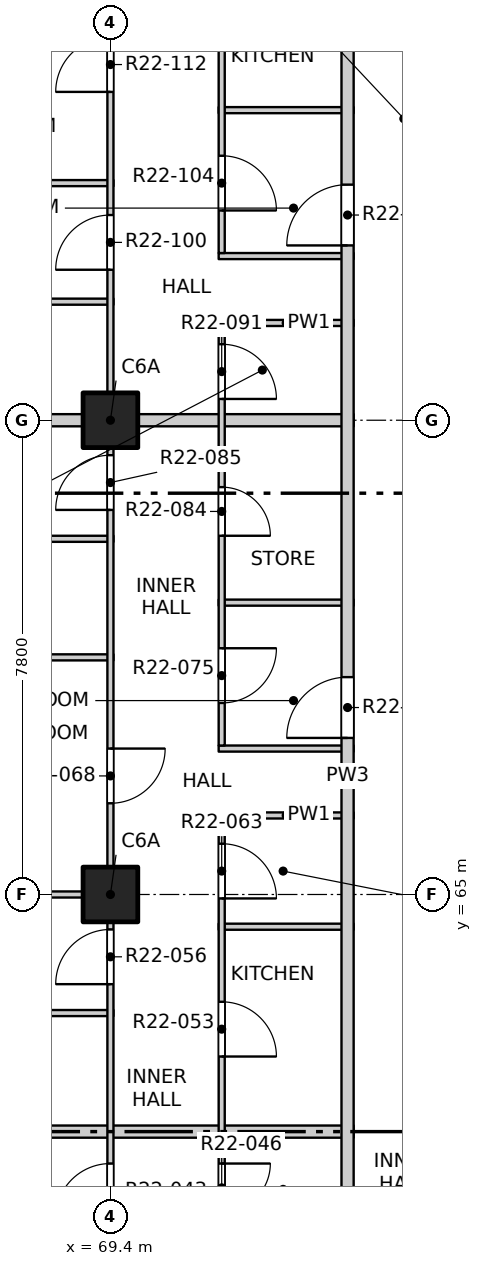
"""IFC4 building model, lengths in metres.
Left out: names, types, materials, properties, quantities, classifications, styles, units other than length and angle.
Written with IfcOpenShell. Run it as: python <this file> out.ifc"""

import sys

from ifc_helpers import new_model, si_unit, direction, frame, frame_2d, origin, origin_2d, place, context, subcontext, project, spatial, rectangle, extrude, element, fill, save


model = new_model("IFC4")
c1 = context("Model", 3, precision=1e-05, world=origin(), true_north=direction((0.0, 1.0)))
c2 = subcontext(c1, "Body", "Model", "MODEL_VIEW")
j1 = project(units=[si_unit("LENGTHUNIT", "METRE"), si_unit("PLANEANGLEUNIT", "RADIAN")], contexts=[c1])
p1 = place(None, origin())
s1 = spatial("IfcSite", under=j1, at=p1, CompositionType="ELEMENT")
p2 = place(p1, origin())
s2 = spatial("IfcBuilding", under=s1, at=p2, CompositionType="ELEMENT")
p3 = place(p2, frame((0.0, 0.0, 224.5)))
s3 = spatial("IfcBuildingStorey", under=s2, at=p3, CompositionType="ELEMENT", Elevation=224.5)
for number, where, z_axis, x_axis in (
    (1, (69.4, 65.0, -0.25), (0.0, 0.0, 1.0), (1.0, 0.0, 0.0)),
    (2, (69.4, 72.8, -0.25), (0.0, 0.0, 1.0), (1.0, 0.0, 0.0)),
):
    element("IfcColumn", number, at=place(p3, frame(where, z_axis=z_axis, x_axis=x_axis)), inside=s3, PredefinedType="COLUMN", context=c2, shape_type="SweptSolid", body=[
        extrude(rectangle(XDim=0.9, YDim=0.9, at=origin_2d()), origin(), (0.0, 0.0, 1.0), 3.4),
    ])
p4 = place(p3, frame((61.9, 61.1, 0.0), z_axis=(0.0, 0.0, 1.0), x_axis=(1.0, 0.0, 0.0)))
e3 = element("IfcWall", 3, at=p4, inside=s3, PredefinedType="PARTITIONING", context=c2, shape_type="SweptSolid", body=[
    extrude(rectangle(XDim=11.5, YDim=0.2, at=frame_2d((5.75, 0.0))), origin(), (0.0, 0.0, 1.0), 2.55),
])
p5 = place(p3, frame((65.75, 63.05, 0.0), z_axis=(0.0, 0.0, 1.0), x_axis=(1.0, 0.0, 0.0)))
e4 = element("IfcWall", 4, at=p5, inside=s3, PredefinedType="PARTITIONING", context=c2, shape_type="SweptSolid", body=[
    extrude(rectangle(XDim=3.7, YDim=0.1, at=frame_2d((1.85, 0.0))), origin(), (0.0, 0.0, 1.0), 3.15),
])
p6 = place(p3, frame((71.18, 64.47, 0.0), z_axis=(0.0, 0.0, 1.0), x_axis=(1.0, 0.0, 0.0)))
e5 = element("IfcWall", 5, at=p6, inside=s3, PredefinedType="PARTITIONING", context=c2, shape_type="SweptSolid", body=[
    extrude(rectangle(XDim=2.22, YDim=0.1, at=frame_2d((1.11, 0.0))), origin(), (0.0, 0.0, 1.0), 3.15),
])
p7 = place(p3, frame((61.9, 65.0, 0.0), z_axis=(0.0, 0.0, 1.0), x_axis=(1.0, 0.0, 0.0)))
e6 = element("IfcWall", 6, at=p7, inside=s3, PredefinedType="PARTITIONING", context=c2, shape_type="SweptSolid", body=[
    extrude(rectangle(XDim=7.55, YDim=0.1, at=frame_2d((3.775, 0.0))), origin(), (0.0, 0.0, 1.0), 3.15),
])
for number, where, z_axis, x_axis in (
    (7, (71.18, 66.3, 0.0), (0.0, 0.0, 1.0), (1.0, 0.0, 0.0)),
    (8, (71.18, 67.4, 0.0), (0.0, 0.0, 1.0), (1.0, 0.0, 0.0)),
):
    element("IfcWall", number, at=place(p3, frame(where, z_axis=z_axis, x_axis=x_axis)), inside=s3, PredefinedType="PARTITIONING", context=c2, shape_type="SweptSolid", body=[
        extrude(rectangle(XDim=2.22, YDim=0.1, at=frame_2d((1.11, 0.0))), origin(), (0.0, 0.0, 1.0), 3.15),
    ])
p8 = place(p3, frame((61.9, 68.9, 0.0), z_axis=(0.0, 0.0, 1.0), x_axis=(1.0, 0.0, 0.0)))
e9 = element("IfcWall", 9, at=p8, inside=s3, PredefinedType="PARTITIONING", context=c2, shape_type="SweptSolid", body=[
    extrude(rectangle(XDim=7.55, YDim=0.1, at=frame_2d((3.775, 0.0))), origin(), (0.0, 0.0, 1.0), 2.55),
])
p9 = place(p3, frame((71.18, 69.8, 0.0), z_axis=(0.0, 0.0, 1.0), x_axis=(1.0, 0.0, 0.0)))
e10 = element("IfcWall", 10, at=p9, inside=s3, PredefinedType="PARTITIONING", context=c2, shape_type="SweptSolid", body=[
    extrude(rectangle(XDim=2.22, YDim=0.1, at=frame_2d((1.11, 0.0))), origin(), (0.0, 0.0, 1.0), 3.15),
])
p10 = place(p3, frame((65.75, 70.85, 0.0), z_axis=(0.0, 0.0, 1.0), x_axis=(1.0, 0.0, 0.0)))
e11 = element("IfcWall", 11, at=p10, inside=s3, PredefinedType="PARTITIONING", context=c2, shape_type="SweptSolid", body=[
    extrude(rectangle(XDim=3.7, YDim=0.1, at=frame_2d((1.85, 0.0))), origin(), (0.0, 0.0, 1.0), 3.15),
])
p11 = place(p3, frame((61.9, 72.8, 0.0), z_axis=(0.0, 0.0, 1.0), x_axis=(1.0, 0.0, 0.0)))
e12 = element("IfcWall", 12, at=p11, inside=s3, PredefinedType="PARTITIONING", context=c2, shape_type="SweptSolid", body=[
    extrude(rectangle(XDim=11.5, YDim=0.2, at=frame_2d((5.75, 0.0))), origin(), (0.0, 0.0, 1.0), 3.15),
])
p12 = place(p3, frame((71.18, 74.4, 0.0), z_axis=(0.0, 0.0, 1.0), x_axis=(1.0, 0.0, 0.0)))
e13 = element("IfcWall", 13, at=p12, inside=s3, PredefinedType="PARTITIONING", context=c2, shape_type="SweptSolid", body=[
    extrude(rectangle(XDim=2.22, YDim=0.1, at=frame_2d((1.11, 0.0))), origin(), (0.0, 0.0, 1.0), 3.15),
])
p13 = place(p3, frame((65.9, 74.75, 0.0), z_axis=(0.0, 0.0, 1.0), x_axis=(1.0, 0.0, 0.0)))
e14 = element("IfcWall", 14, at=p13, inside=s3, PredefinedType="PARTITIONING", context=c2, shape_type="SweptSolid", body=[
    extrude(rectangle(XDim=3.55, YDim=0.1, at=frame_2d((1.775, 0.0))), origin(), (0.0, 0.0, 1.0), 3.15),
])
p14 = place(p3, frame((71.18, 75.5, 0.0), z_axis=(0.0, 0.0, 1.0), x_axis=(1.0, 0.0, 0.0)))
e15 = element("IfcWall", 15, at=p14, inside=s3, PredefinedType="PARTITIONING", context=c2, shape_type="SweptSolid", body=[
    extrude(rectangle(XDim=2.22, YDim=0.1, at=frame_2d((1.11, 0.0))), origin(), (0.0, 0.0, 1.0), 3.15),
])
p15 = place(p3, frame((61.9, 76.7, 0.0), z_axis=(0.0, 0.0, 1.0), x_axis=(1.0, 0.0, 0.0)))
e16 = element("IfcWall", 16, at=p15, inside=s3, PredefinedType="PARTITIONING", context=c2, shape_type="SweptSolid", body=[
    extrude(rectangle(XDim=7.55, YDim=0.1, at=frame_2d((3.775, 0.0))), origin(), (0.0, 0.0, 1.0), 2.55),
])
p16 = place(p3, frame((71.18, 77.9, 0.0), z_axis=(0.0, 0.0, 1.0), x_axis=(1.0, 0.0, 0.0)))
e17 = element("IfcWall", 17, at=p16, inside=s3, PredefinedType="PARTITIONING", context=c2, shape_type="SweptSolid", body=[
    extrude(rectangle(XDim=2.22, YDim=0.1, at=frame_2d((1.11, 0.0))), origin(), (0.0, 0.0, 1.0), 3.15),
])
p17 = place(p3, frame((69.4, 41.9, 0.0), z_axis=(0.0, 0.0, 1.0), x_axis=(0.0, 1.0, 0.0)))
e18 = element("IfcWall", 18, at=p17, inside=s3, PredefinedType="PARTITIONING", context=c2, shape_type="SweptSolid", body=[
    extrude(rectangle(XDim=46.2, YDim=0.1, at=frame_2d((23.1, 0.0))), origin(), (0.0, 0.0, 1.0), 3.15),
])
p18 = place(p17, frame((1.2, 0.0, 0.0)))
e19 = element("IfcOpeningElement", 19, at=p18, cuts=e18, PredefinedType="OPENING", context=c2, shape_type="SweptSolid", body=[
    extrude(rectangle(XDim=0.9, YDim=2.1, at=frame_2d((0.45, 1.05))), frame((0.0, 0.06, 0.0), z_axis=(0.0, -1.0, 0.0), x_axis=(1.0, 0.0, 0.0)), (0.0, 0.0, 1.0), 0.12),
])
p19 = place(p17, frame((5.1, 0.0, 0.0)))
e20 = element("IfcOpeningElement", 20, at=p19, cuts=e18, PredefinedType="OPENING", context=c2, shape_type="SweptSolid", body=[
    extrude(rectangle(XDim=0.9, YDim=2.1, at=frame_2d((0.45, 1.05))), frame((0.0, 0.06, 0.0), z_axis=(0.0, -1.0, 0.0), x_axis=(1.0, 0.0, 0.0)), (0.0, 0.0, 1.0), 0.12),
])
p20 = place(p17, frame((9.0, 0.0, 0.0)))
e21 = element("IfcOpeningElement", 21, at=p20, cuts=e18, PredefinedType="OPENING", context=c2, shape_type="SweptSolid", body=[
    extrude(rectangle(XDim=0.9, YDim=2.1, at=frame_2d((0.45, 1.05))), frame((0.0, 0.06, 0.0), z_axis=(0.0, -1.0, 0.0), x_axis=(1.0, 0.0, 0.0)), (0.0, 0.0, 1.0), 0.12),
])
p21 = place(p17, frame((13.85, 0.0, 0.0)))
e22 = element("IfcOpeningElement", 22, at=p21, cuts=e18, PredefinedType="OPENING", context=c2, shape_type="SweptSolid", body=[
    extrude(rectangle(XDim=0.9, YDim=2.1, at=frame_2d((0.45, 1.05))), frame((0.0, 0.06, 0.0), z_axis=(0.0, -1.0, 0.0), x_axis=(1.0, 0.0, 0.0)), (0.0, 0.0, 1.0), 0.12),
])
p22 = place(p17, frame((17.775, 0.0, 0.0)))
e23 = element("IfcOpeningElement", 23, at=p22, cuts=e18, PredefinedType="OPENING", context=c2, shape_type="SweptSolid", body=[
    extrude(rectangle(XDim=0.9, YDim=2.1, at=frame_2d((0.45, 1.05))), frame((0.0, 0.06, 0.0), z_axis=(0.0, -1.0, 0.0), x_axis=(1.0, 0.0, 0.0)), (0.0, 0.0, 1.0), 0.12),
])
p23 = place(p17, frame((21.625, 0.0, 0.0)))
e24 = element("IfcOpeningElement", 24, at=p23, cuts=e18, PredefinedType="OPENING", context=c2, shape_type="SweptSolid", body=[
    extrude(rectangle(XDim=0.9, YDim=2.1, at=frame_2d((0.45, 1.05))), frame((0.0, 0.06, 0.0), z_axis=(0.0, -1.0, 0.0), x_axis=(1.0, 0.0, 0.0)), (0.0, 0.0, 1.0), 0.12),
])
p24 = place(p17, frame((24.6, 0.0, 0.0)))
e25 = element("IfcOpeningElement", 25, at=p24, cuts=e18, PredefinedType="OPENING", context=c2, shape_type="SweptSolid", body=[
    extrude(rectangle(XDim=0.9, YDim=2.1, at=frame_2d((0.45, 1.05))), frame((0.0, 0.06, 0.0), z_axis=(0.0, -1.0, 0.0), x_axis=(1.0, 0.0, 0.0)), (0.0, 0.0, 1.0), 0.12),
])
p25 = place(p17, frame((29.425, 0.0, 0.0)))
e26 = element("IfcOpeningElement", 26, at=p25, cuts=e18, PredefinedType="OPENING", context=c2, shape_type="SweptSolid", body=[
    extrude(rectangle(XDim=0.9, YDim=2.1, at=frame_2d((0.45, 1.05))), frame((0.0, 0.06, 0.0), z_axis=(0.0, -1.0, 0.0), x_axis=(1.0, 0.0, 0.0)), (0.0, 0.0, 1.0), 0.12),
])
p26 = place(p17, frame((33.375, 0.0, 0.0)))
e27 = element("IfcOpeningElement", 27, at=p26, cuts=e18, PredefinedType="OPENING", context=c2, shape_type="SweptSolid", body=[
    extrude(rectangle(XDim=0.9, YDim=2.1, at=frame_2d((0.45, 1.05))), frame((0.0, 0.06, 0.0), z_axis=(0.0, -1.0, 0.0), x_axis=(1.0, 0.0, 0.0)), (0.0, 0.0, 1.0), 0.12),
])
p27 = place(p17, frame((36.3, 0.0, 0.0)))
e28 = element("IfcOpeningElement", 28, at=p27, cuts=e18, PredefinedType="OPENING", context=c2, shape_type="SweptSolid", body=[
    extrude(rectangle(XDim=0.9, YDim=2.1, at=frame_2d((0.45, 1.05))), frame((0.0, 0.06, 0.0), z_axis=(0.0, -1.0, 0.0), x_axis=(1.0, 0.0, 0.0)), (0.0, 0.0, 1.0), 0.12),
])
p28 = place(p17, frame((41.175, 0.0, 0.0)))
e29 = element("IfcOpeningElement", 29, at=p28, cuts=e18, PredefinedType="OPENING", context=c2, shape_type="SweptSolid", body=[
    extrude(rectangle(XDim=0.9, YDim=2.1, at=frame_2d((0.45, 1.05))), frame((0.0, 0.06, 0.0), z_axis=(0.0, -1.0, 0.0), x_axis=(1.0, 0.0, 0.0)), (0.0, 0.0, 1.0), 0.12),
])
p29 = place(p17, frame((44.1, 0.0, 0.0)))
e30 = element("IfcOpeningElement", 30, at=p29, cuts=e18, PredefinedType="OPENING", context=c2, shape_type="SweptSolid", body=[
    extrude(rectangle(XDim=0.9, YDim=2.1, at=frame_2d((0.45, 1.05))), frame((0.0, 0.06, 0.0), z_axis=(0.0, -1.0, 0.0), x_axis=(1.0, 0.0, 0.0)), (0.0, 0.0, 1.0), 0.12),
])
p30 = place(p3, frame((71.23, 55.4, 0.0), z_axis=(0.0, 0.0, 1.0), x_axis=(0.0, 1.0, 0.0)))
e31 = element("IfcWall", 31, at=p30, inside=s3, PredefinedType="PARTITIONING", context=c2, shape_type="SweptSolid", body=[
    extrude(rectangle(XDim=10.85, YDim=0.1, at=frame_2d((5.425, 0.0))), origin(), (0.0, 0.0, 1.0), 3.15),
])
p31 = place(p30, frame((0.6, 0.0, 0.0)))
e32 = element("IfcOpeningElement", 32, at=p31, cuts=e31, PredefinedType="OPENING", context=c2, shape_type="SweptSolid", body=[
    extrude(rectangle(XDim=0.8, YDim=2.1, at=frame_2d((0.4, 1.05))), frame((0.0, 0.06, 0.0), z_axis=(0.0, -1.0, 0.0), x_axis=(1.0, 0.0, 0.0)), (0.0, 0.0, 1.0), 0.12),
])
p32 = place(p30, frame((2.5, 0.0, 0.0)))
e33 = element("IfcOpeningElement", 33, at=p32, cuts=e31, PredefinedType="OPENING", context=c2, shape_type="SweptSolid", body=[
    extrude(rectangle(XDim=0.9, YDim=2.1, at=frame_2d((0.45, 1.05))), frame((0.0, 0.06, 0.0), z_axis=(0.0, -1.0, 0.0), x_axis=(1.0, 0.0, 0.0)), (0.0, 0.0, 1.0), 0.12),
])
p33 = place(p30, frame((4.375, 0.0, 0.0)))
e34 = element("IfcOpeningElement", 34, at=p33, cuts=e31, PredefinedType="OPENING", context=c2, shape_type="SweptSolid", body=[
    extrude(rectangle(XDim=0.8, YDim=2.1, at=frame_2d((0.4, 1.05))), frame((0.0, 0.06, 0.0), z_axis=(0.0, -1.0, 0.0), x_axis=(1.0, 0.0, 0.0)), (0.0, 0.0, 1.0), 0.12),
])
p34 = place(p30, frame((6.935, 0.0, 0.0)))
e35 = element("IfcOpeningElement", 35, at=p34, cuts=e31, PredefinedType="OPENING", context=c2, shape_type="SweptSolid", body=[
    extrude(rectangle(XDim=0.9, YDim=2.1, at=frame_2d((0.45, 1.05))), frame((0.0, 0.06, 0.0), z_axis=(0.0, -1.0, 0.0), x_axis=(1.0, 0.0, 0.0)), (0.0, 0.0, 1.0), 0.12),
])
p35 = place(p30, frame((9.535, 0.0, 0.0)))
e36 = element("IfcOpeningElement", 36, at=p35, cuts=e31, PredefinedType="OPENING", context=c2, shape_type="SweptSolid", body=[
    extrude(rectangle(XDim=0.9, YDim=2.1, at=frame_2d((0.45, 1.05))), frame((0.0, 0.06, 0.0), z_axis=(0.0, -1.0, 0.0), x_axis=(1.0, 0.0, 0.0)), (0.0, 0.0, 1.0), 0.12),
])
p36 = place(p3, frame((71.23, 67.45, 0.0), z_axis=(0.0, 0.0, 1.0), x_axis=(0.0, 1.0, 0.0)))
e37 = element("IfcWall", 37, at=p36, inside=s3, PredefinedType="PARTITIONING", context=c2, shape_type="SweptSolid", body=[
    extrude(rectangle(XDim=6.9, YDim=0.1, at=frame_2d((3.45, 0.0))), origin(), (0.0, 0.0, 1.0), 3.15),
])
p37 = place(p36, frame((0.7, 0.0, 0.0)))
e38 = element("IfcOpeningElement", 38, at=p37, cuts=e37, PredefinedType="OPENING", context=c2, shape_type="SweptSolid", body=[
    extrude(rectangle(XDim=0.9, YDim=2.1, at=frame_2d((0.45, 1.05))), frame((0.0, 0.06, 0.0), z_axis=(0.0, -1.0, 0.0), x_axis=(1.0, 0.0, 0.0)), (0.0, 0.0, 1.0), 0.12),
])
p38 = place(p36, frame((3.45, 0.0, 0.0)))
e39 = element("IfcOpeningElement", 39, at=p38, cuts=e37, PredefinedType="OPENING", context=c2, shape_type="SweptSolid", body=[
    extrude(rectangle(XDim=0.8, YDim=2.1, at=frame_2d((0.4, 1.05))), frame((0.0, 0.06, 0.0), z_axis=(0.0, -1.0, 0.0), x_axis=(1.0, 0.0, 0.0)), (0.0, 0.0, 1.0), 0.12),
])
p39 = place(p36, frame((5.7, 0.0, 0.0)))
e40 = element("IfcOpeningElement", 40, at=p39, cuts=e37, PredefinedType="OPENING", context=c2, shape_type="SweptSolid", body=[
    extrude(rectangle(XDim=0.9, YDim=2.1, at=frame_2d((0.45, 1.05))), frame((0.0, 0.06, 0.0), z_axis=(0.0, -1.0, 0.0), x_axis=(1.0, 0.0, 0.0)), (0.0, 0.0, 1.0), 0.12),
])
p40 = place(p3, frame((71.23, 75.55, 0.0), z_axis=(0.0, 0.0, 1.0), x_axis=(0.0, 1.0, 0.0)))
e41 = element("IfcWall", 41, at=p40, inside=s3, PredefinedType="PARTITIONING", context=c2, shape_type="SweptSolid", body=[
    extrude(rectangle(XDim=8.9, YDim=0.1, at=frame_2d((4.45, 0.0))), origin(), (0.0, 0.0, 1.0), 3.15),
])
p41 = place(p40, frame((0.7, 0.0, 0.0)))
e42 = element("IfcOpeningElement", 42, at=p41, cuts=e41, PredefinedType="OPENING", context=c2, shape_type="SweptSolid", body=[
    extrude(rectangle(XDim=0.9, YDim=2.1, at=frame_2d((0.45, 1.05))), frame((0.0, 0.06, 0.0), z_axis=(0.0, -1.0, 0.0), x_axis=(1.0, 0.0, 0.0)), (0.0, 0.0, 1.0), 0.12),
])
p42 = place(p40, frame((3.75, 0.0, 0.0)))
e43 = element("IfcOpeningElement", 43, at=p42, cuts=e41, PredefinedType="OPENING", context=c2, shape_type="SweptSolid", body=[
    extrude(rectangle(XDim=0.9, YDim=2.1, at=frame_2d((0.45, 1.05))), frame((0.0, 0.06, 0.0), z_axis=(0.0, -1.0, 0.0), x_axis=(1.0, 0.0, 0.0)), (0.0, 0.0, 1.0), 0.12),
])
p43 = place(p40, frame((7.1, 0.0, 0.0)))
e44 = element("IfcOpeningElement", 44, at=p43, cuts=e41, PredefinedType="OPENING", context=c2, shape_type="SweptSolid", body=[
    extrude(rectangle(XDim=0.8, YDim=2.1, at=frame_2d((0.4, 1.05))), frame((0.0, 0.06, 0.0), z_axis=(0.0, -1.0, 0.0), x_axis=(1.0, 0.0, 0.0)), (0.0, 0.0, 1.0), 0.12),
])
p44 = place(p3, frame((73.3, 49.5, 0.0), z_axis=(0.0, 0.0, 1.0), x_axis=(0.0, 1.0, 0.0)))
e45 = element("IfcWall", 45, at=p44, inside=s3, PredefinedType="PARTITIONING", context=c2, shape_type="SweptSolid", body=[
    extrude(rectangle(XDim=34.9, YDim=0.2, at=frame_2d((17.45, 0.0))), origin(), (0.0, 0.0, 1.0), 3.15),
])
p45 = place(p44, frame((3.575, 0.0, 0.0)))
e46 = element("IfcOpeningElement", 46, at=p45, cuts=e45, PredefinedType="OPENING", context=c2, shape_type="SweptSolid", body=[
    extrude(rectangle(XDim=1.0, YDim=2.1, at=frame_2d((0.5, 1.05))), frame((0.0, 0.11, 0.0), z_axis=(0.0, -1.0, 0.0), x_axis=(1.0, 0.0, 0.0)), (0.0, 0.0, 1.0), 0.22),
])
p46 = place(p44, frame((18.075, 0.0, 0.0)))
e47 = element("IfcOpeningElement", 47, at=p46, cuts=e45, PredefinedType="OPENING", context=c2, shape_type="SweptSolid", body=[
    extrude(rectangle(XDim=1.0, YDim=2.1, at=frame_2d((0.5, 1.05))), frame((0.0, 0.11, 0.0), z_axis=(0.0, -1.0, 0.0), x_axis=(1.0, 0.0, 0.0)), (0.0, 0.0, 1.0), 0.22),
])
p47 = place(p44, frame((26.175, 0.0, 0.0)))
e48 = element("IfcOpeningElement", 48, at=p47, cuts=e45, PredefinedType="OPENING", context=c2, shape_type="SweptSolid", body=[
    extrude(rectangle(XDim=1.0, YDim=2.1, at=frame_2d((0.5, 1.05))), frame((0.0, 0.11, 0.0), z_axis=(0.0, -1.0, 0.0), x_axis=(1.0, 0.0, 0.0)), (0.0, 0.0, 1.0), 0.22),
])
p48 = place(p22, origin())
e49 = element("IfcDoor", 49, at=p48, inside=s3, OperationType="SINGLE_SWING_LEFT", PredefinedType="DOOR", context=c2, shape_type="SweptSolid", body=[
    extrude(rectangle(XDim=0.9, YDim=2.1, at=frame_2d((0.45, 1.05))), frame((0.0, 0.025, 0.0), z_axis=(0.0, -1.0, 0.0), x_axis=(1.0, 0.0, 0.0)), (0.0, 0.0, 1.0), 0.05),
])
fill(e23, e49)
p49 = place(p33, origin())
e50 = element("IfcDoor", 50, at=p49, inside=s3, OperationType="SINGLE_SWING_LEFT", PredefinedType="DOOR", context=c2, shape_type="SweptSolid", body=[
    extrude(rectangle(XDim=0.8, YDim=2.1, at=frame_2d((0.4, 1.05))), frame((0.0, 0.025, 0.0), z_axis=(0.0, -1.0, 0.0), x_axis=(1.0, 0.0, 0.0)), (0.0, 0.0, 1.0), 0.05),
])
fill(e34, e50)
p50 = place(p34, origin())
e51 = element("IfcDoor", 51, at=p50, inside=s3, OperationType="SINGLE_SWING_RIGHT", PredefinedType="DOOR", context=c2, shape_type="SweptSolid", body=[
    extrude(rectangle(XDim=0.9, YDim=2.1, at=frame_2d((0.45, 1.05))), frame((0.0, 0.025, 0.0), z_axis=(0.0, -1.0, 0.0), x_axis=(1.0, 0.0, 0.0)), (0.0, 0.0, 1.0), 0.05),
])
fill(e35, e51)
p51 = place(p23, origin())
e52 = element("IfcDoor", 52, at=p51, inside=s3, OperationType="SINGLE_SWING_LEFT", PredefinedType="DOOR", context=c2, shape_type="SweptSolid", body=[
    extrude(rectangle(XDim=0.9, YDim=2.1, at=frame_2d((0.45, 1.05))), frame((0.0, 0.025, 0.0), z_axis=(0.0, -1.0, 0.0), x_axis=(1.0, 0.0, 0.0)), (0.0, 0.0, 1.0), 0.05),
])
fill(e24, e52)
p52 = place(p35, origin())
e53 = element("IfcDoor", 53, at=p52, inside=s3, OperationType="SINGLE_SWING_RIGHT", PredefinedType="DOOR", context=c2, shape_type="SweptSolid", body=[
    extrude(rectangle(XDim=0.9, YDim=2.1, at=frame_2d((0.45, 1.05))), frame((0.0, 0.025, 0.0), z_axis=(0.0, -1.0, 0.0), x_axis=(1.0, 0.0, 0.0)), (0.0, 0.0, 1.0), 0.05),
])
fill(e36, e53)
p53 = place(p24, origin())
e54 = element("IfcDoor", 54, at=p53, inside=s3, OperationType="SINGLE_SWING_LEFT", PredefinedType="DOOR", context=c2, shape_type="SweptSolid", body=[
    extrude(rectangle(XDim=0.9, YDim=2.1, at=frame_2d((0.45, 1.05))), frame((0.0, 0.025, 0.0), z_axis=(0.0, -1.0, 0.0), x_axis=(1.0, 0.0, 0.0)), (0.0, 0.0, 1.0), 0.05),
])
fill(e25, e54)
p54 = place(p46, origin())
e55 = element("IfcDoor", 55, at=p54, inside=s3, OperationType="SINGLE_SWING_RIGHT", PredefinedType="DOOR", context=c2, shape_type="SweptSolid", body=[
    extrude(rectangle(XDim=1.0, YDim=2.1, at=frame_2d((0.5, 1.05))), frame((0.0, 0.025, 0.0), z_axis=(0.0, -1.0, 0.0), x_axis=(1.0, 0.0, 0.0)), (0.0, 0.0, 1.0), 0.05),
])
fill(e47, e55)
p55 = place(p37, origin())
e56 = element("IfcDoor", 56, at=p55, inside=s3, OperationType="SINGLE_SWING_LEFT", PredefinedType="DOOR", context=c2, shape_type="SweptSolid", body=[
    extrude(rectangle(XDim=0.9, YDim=2.1, at=frame_2d((0.45, 1.05))), frame((0.0, 0.025, 0.0), z_axis=(0.0, -1.0, 0.0), x_axis=(1.0, 0.0, 0.0)), (0.0, 0.0, 1.0), 0.05),
])
fill(e38, e56)
p56 = place(p38, origin())
e57 = element("IfcDoor", 57, at=p56, inside=s3, OperationType="SINGLE_SWING_RIGHT", PredefinedType="DOOR", context=c2, shape_type="SweptSolid", body=[
    extrude(rectangle(XDim=0.8, YDim=2.1, at=frame_2d((0.4, 1.05))), frame((0.0, 0.025, 0.0), z_axis=(0.0, -1.0, 0.0), x_axis=(1.0, 0.0, 0.0)), (0.0, 0.0, 1.0), 0.05),
])
fill(e39, e57)
p57 = place(p25, origin())
e58 = element("IfcDoor", 58, at=p57, inside=s3, OperationType="SINGLE_SWING_LEFT", PredefinedType="DOOR", context=c2, shape_type="SweptSolid", body=[
    extrude(rectangle(XDim=0.9, YDim=2.1, at=frame_2d((0.45, 1.05))), frame((0.0, 0.025, 0.0), z_axis=(0.0, -1.0, 0.0), x_axis=(1.0, 0.0, 0.0)), (0.0, 0.0, 1.0), 0.05),
])
fill(e26, e58)
p58 = place(p39, origin())
e59 = element("IfcDoor", 59, at=p58, inside=s3, OperationType="SINGLE_SWING_RIGHT", PredefinedType="DOOR", context=c2, shape_type="SweptSolid", body=[
    extrude(rectangle(XDim=0.9, YDim=2.1, at=frame_2d((0.45, 1.05))), frame((0.0, 0.025, 0.0), z_axis=(0.0, -1.0, 0.0), x_axis=(1.0, 0.0, 0.0)), (0.0, 0.0, 1.0), 0.05),
])
fill(e40, e59)
p59 = place(p26, origin())
e60 = element("IfcDoor", 60, at=p59, inside=s3, OperationType="SINGLE_SWING_LEFT", PredefinedType="DOOR", context=c2, shape_type="SweptSolid", body=[
    extrude(rectangle(XDim=0.9, YDim=2.1, at=frame_2d((0.45, 1.05))), frame((0.0, 0.025, 0.0), z_axis=(0.0, -1.0, 0.0), x_axis=(1.0, 0.0, 0.0)), (0.0, 0.0, 1.0), 0.05),
])
fill(e27, e60)
p60 = place(p47, origin())
e61 = element("IfcDoor", 61, at=p60, inside=s3, OperationType="SINGLE_SWING_RIGHT", PredefinedType="DOOR", context=c2, shape_type="SweptSolid", body=[
    extrude(rectangle(XDim=1.0, YDim=2.1, at=frame_2d((0.5, 1.05))), frame((0.0, 0.025, 0.0), z_axis=(0.0, -1.0, 0.0), x_axis=(1.0, 0.0, 0.0)), (0.0, 0.0, 1.0), 0.05),
])
fill(e48, e61)
p61 = place(p41, origin())
e62 = element("IfcDoor", 62, at=p61, inside=s3, OperationType="SINGLE_SWING_RIGHT", PredefinedType="DOOR", context=c2, shape_type="SweptSolid", body=[
    extrude(rectangle(XDim=0.9, YDim=2.1, at=frame_2d((0.45, 1.05))), frame((0.0, 0.025, 0.0), z_axis=(0.0, -1.0, 0.0), x_axis=(1.0, 0.0, 0.0)), (0.0, 0.0, 1.0), 0.05),
])
fill(e42, e62)
p62 = place(p27, origin())
e63 = element("IfcDoor", 63, at=p62, inside=s3, OperationType="SINGLE_SWING_LEFT", PredefinedType="DOOR", context=c2, shape_type="SweptSolid", body=[
    extrude(rectangle(XDim=0.9, YDim=2.1, at=frame_2d((0.45, 1.05))), frame((0.0, 0.025, 0.0), z_axis=(0.0, -1.0, 0.0), x_axis=(1.0, 0.0, 0.0)), (0.0, 0.0, 1.0), 0.05),
])
fill(e28, e63)
save(model, sys.argv[1])
